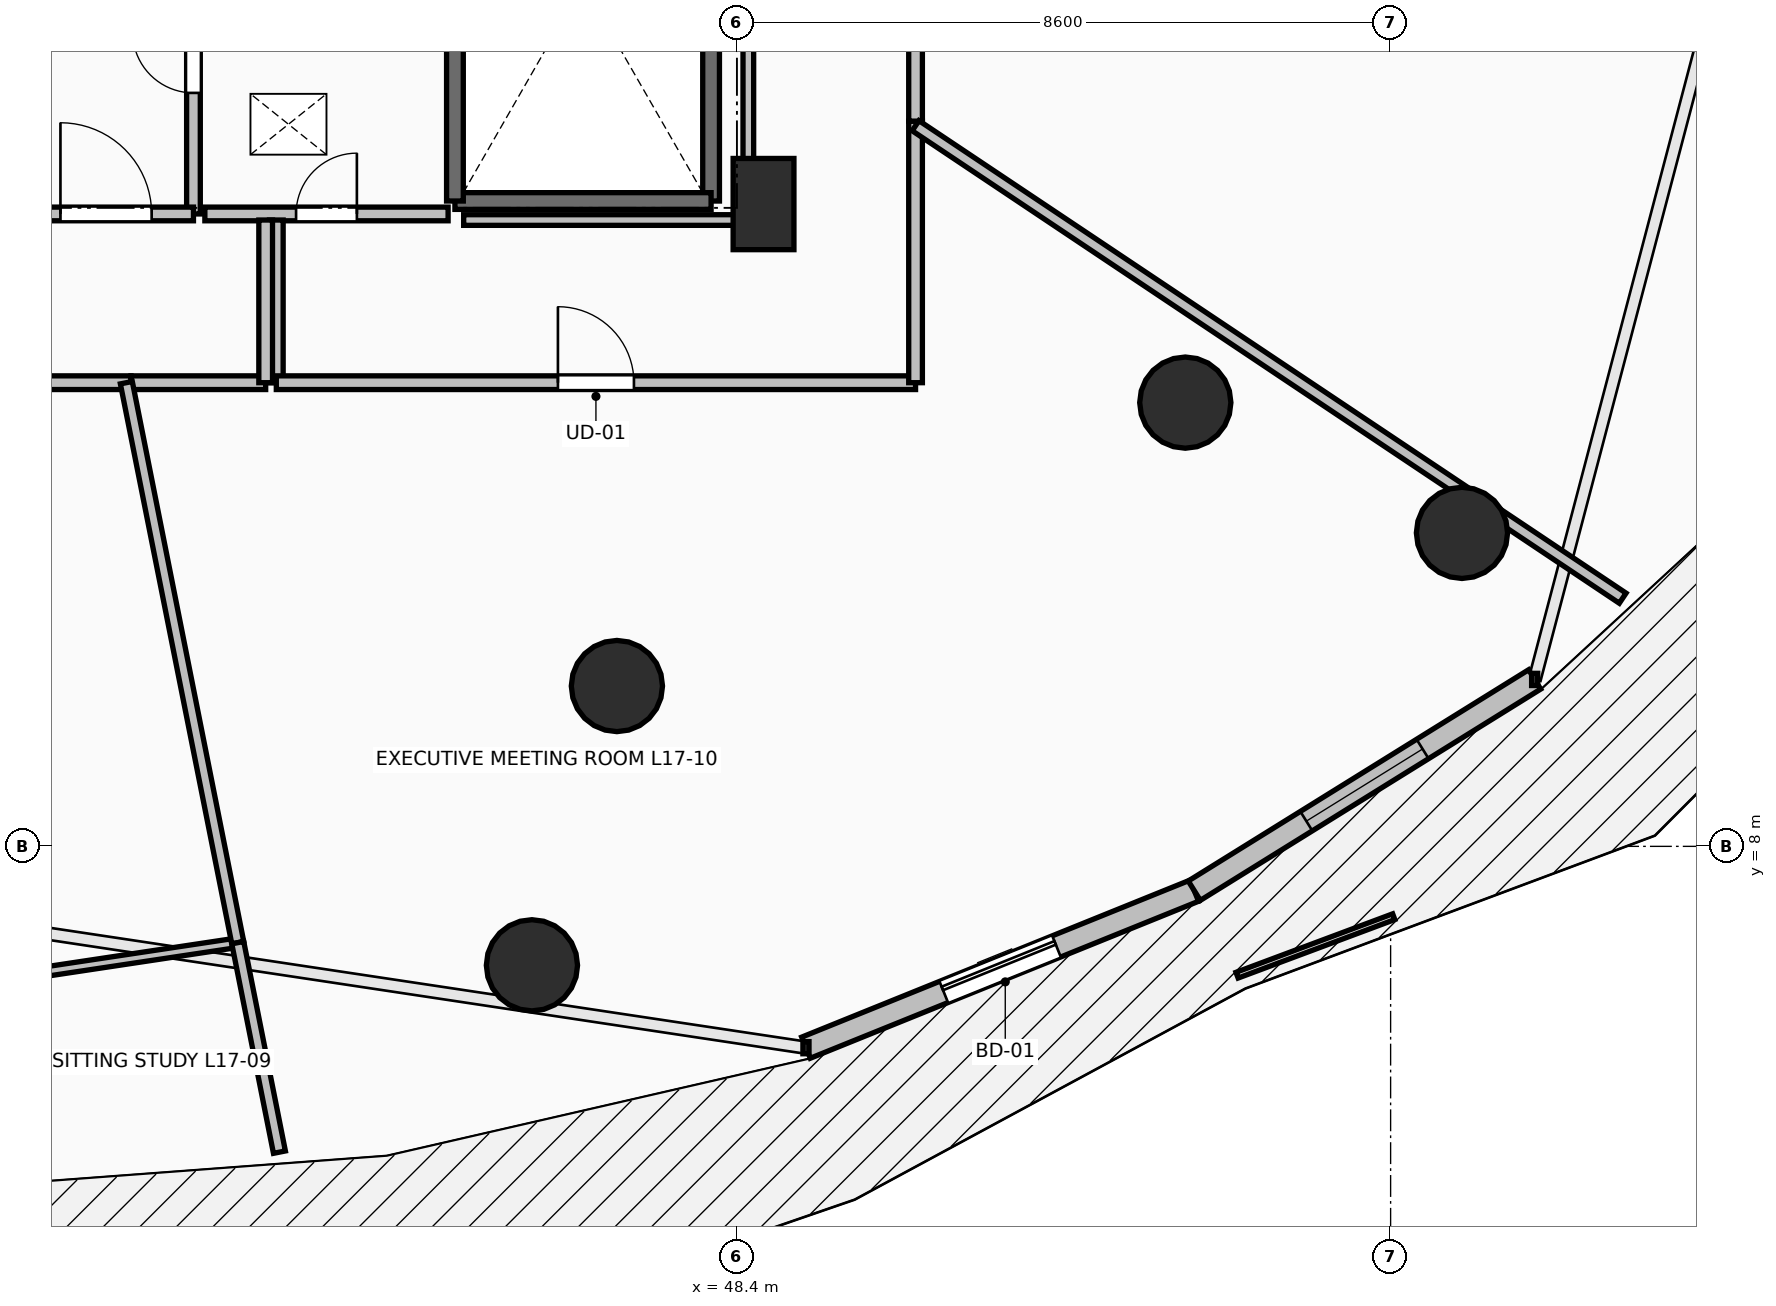
"""IFC4 building model, lengths in metres.
Left out: names, types, materials, properties, quantities, classifications, styles, units other than length and angle.
Written with IfcOpenShell. Run it as: python <this file> out.ifc"""

import sys

from ifc_helpers import new_model, si_unit, direction, frame, frame_2d, origin, origin_2d, place, context, subcontext, project, spatial, rectangle, circle, extrude, element, fill, save


model = new_model("IFC4")
c1 = context("Model", 3, precision=1e-05, world=origin(), true_north=direction((0.0, 1.0)))
c2 = subcontext(c1, "Body", "Model", "MODEL_VIEW")
j1 = project(units=[si_unit("LENGTHUNIT", "METRE"), si_unit("PLANEANGLEUNIT", "RADIAN")], contexts=[c1])
p1 = place(None, origin())
s1 = spatial("IfcSite", under=j1, at=p1, CompositionType="ELEMENT")
p2 = place(p1, origin())
s2 = spatial("IfcBuilding", under=s1, at=p2, CompositionType="ELEMENT")
p3 = place(p2, frame((0.0, 0.0, 66.0)))
s3 = spatial("IfcBuildingStorey", under=s2, at=p3, CompositionType="ELEMENT", Elevation=66.0)
for number, where, z_axis, x_axis in (
    (1, (46.821, 10.109, 0.0), (0.0, 0.0, 1.0), (0.383, -0.924, 0.0)),
    (2, (54.299, 13.838, 0.0), (0.0, 0.0, 1.0), (0.707, -0.707, 0.0)),
    (3, (45.703, 6.435, 0.0), (0.0, 0.0, 1.0), (0.383, -0.924, 0.0)),
    (4, (57.939, 12.124, 0.0), (0.0, 0.0, 1.0), (0.707, -0.707, 0.0)),
):
    element("IfcColumn", number, at=place(p3, frame(where, z_axis=z_axis, x_axis=x_axis)), inside=s3, PredefinedType="COLUMN", context=c2, shape_type="SweptSolid", body=[
        extrude(circle(Radius=0.6, at=origin_2d()), origin(), (0.0, 0.0, 1.0), 3.5),
    ])
p4 = place(p3, frame((48.75, 16.45, 0.0), z_axis=(0.0, 0.0, 1.0), x_axis=(1.0, 0.0, 0.0)))
e5 = element("IfcColumn", 5, at=p4, inside=s3, PredefinedType="PILASTER", context=c2, shape_type="SweptSolid", body=[
    extrude(rectangle(XDim=0.8, YDim=1.2, at=origin_2d()), origin(), (0.0, 0.0, 1.0), 3.5),
])
p5 = place(p3, frame((49.308, 5.351, 0.0), z_axis=(0.0, 0.0, 1.0), x_axis=(0.927095325176, 0.374825636845, 0.0)))
e6 = element("IfcWall", 6, at=p5, inside=s3, PredefinedType="STANDARD", context=c2, shape_type="SweptSolid", body=[
    extrude(rectangle(XDim=5.51, YDim=0.3, at=frame_2d((2.755, 0.0))), origin(), (0.0, 0.0, 1.0), 3.15),
])
p6 = place(p5, frame((1.955, 0.0, 0.0)))
e7 = element("IfcOpeningElement", 7, at=p6, cuts=e6, PredefinedType="OPENING", context=c2, shape_type="SweptSolid", body=[
    extrude(rectangle(XDim=1.6, YDim=2.3, at=frame_2d((0.8, 1.15))), frame((0.0, 0.165, 0.0), z_axis=(0.0, -1.0, 0.0), x_axis=(1.0, 0.0, 0.0)), (0.0, 0.0, 1.0), 0.33),
])
p7 = place(p3, frame((54.417, 7.417, 0.0), z_axis=(0.0, 0.0, 1.0), x_axis=(0.849633724826, 0.527373239404, 0.0)))
e8 = element("IfcWall", 8, at=p7, inside=s3, PredefinedType="STANDARD", context=c2, shape_type="SweptSolid", body=[
    extrude(rectangle(XDim=5.271, YDim=0.3, at=frame_2d((2.635, 0.0))), origin(), (0.0, 0.0, 1.0), 3.15),
])
p8 = place(p7, frame((1.735, 0.0, 0.85)))
e9 = element("IfcOpeningElement", 9, at=p8, cuts=e8, PredefinedType="OPENING", context=c2, shape_type="SweptSolid", body=[
    extrude(rectangle(XDim=1.8, YDim=2.1, at=frame_2d((0.9, 1.05))), frame((0.0, 0.165, 0.0), z_axis=(0.0, -1.0, 0.0), x_axis=(1.0, 0.0, 0.0)), (0.0, 0.0, 1.0), 0.33),
])
p9 = place(p3, frame((48.06, 23.91, 0.0), z_axis=(0.0, 0.0, 1.0), x_axis=(0.0, -1.0, 0.0)))
e10 = element("IfcWall", 10, at=p9, inside=s3, PredefinedType="SOLIDWALL", context=c2, shape_type="SweptSolid", body=[
    extrude(rectangle(XDim=7.42, YDim=0.22, at=frame_2d((3.71, 0.0))), origin(), (0.0, 0.0, 1.0), 3.15),
])
p10 = place(p3, frame((48.06, 16.49, 0.0), z_axis=(0.0, 0.0, 1.0), x_axis=(-1.0, 0.0, 0.0)))
e11 = element("IfcWall", 11, at=p10, inside=s3, PredefinedType="SOLIDWALL", context=c2, shape_type="SweptSolid", body=[
    extrude(rectangle(XDim=3.37, YDim=0.22, at=frame_2d((1.685, 0.0))), origin(), (0.0, 0.0, 1.0), 3.15),
])
p11 = place(p3, frame((44.69, 16.49, 0.0), z_axis=(0.0, 0.0, 1.0), x_axis=(0.0, 1.0, 0.0)))
e12 = element("IfcWall", 12, at=p11, inside=s3, PredefinedType="SOLIDWALL", context=c2, shape_type="SweptSolid", body=[
    extrude(rectangle(XDim=7.42, YDim=0.22, at=frame_2d((3.71, 0.0))), origin(), (0.0, 0.0, 1.0), 3.15),
])
p12 = place(p3, frame((41.25, 16.32, 0.0), z_axis=(0.0, 0.0, 1.0), x_axis=(0.0, 1.0, 0.0)))
e13 = element("IfcWall", 13, at=p12, inside=s3, PredefinedType="PARTITIONING", context=c2, shape_type="SweptSolid", body=[
    extrude(rectangle(XDim=3.985, YDim=0.18, at=frame_2d((1.992, 0.0))), origin(), (0.0, 0.0, 1.0), 3.15),
])
p13 = place(p12, frame((1.593, 0.0, 0.0)))
e14 = element("IfcOpeningElement", 14, at=p13, cuts=e13, PredefinedType="OPENING", context=c2, shape_type="SweptSolid", body=[
    extrude(rectangle(XDim=0.8, YDim=2.05, at=frame_2d((0.4, 1.025))), frame((0.0, 0.105, 0.0), z_axis=(0.0, -1.0, 0.0), x_axis=(1.0, 0.0, 0.0)), (0.0, 0.0, 1.0), 0.21),
])
p14 = place(p3, frame((38.95, 16.32, 0.0), z_axis=(0.0, 0.0, 1.0), x_axis=(1.0, 0.0, 0.0)))
e15 = element("IfcWall", 15, at=p14, inside=s3, PredefinedType="PARTITIONING", context=c2, shape_type="SweptSolid", body=[
    extrude(rectangle(XDim=2.3, YDim=0.18, at=frame_2d((1.15, 0.0))), origin(), (0.0, 0.0, 1.0), 3.15),
])
p15 = place(p14, frame((0.55, 0.0, 0.0)))
e16 = element("IfcOpeningElement", 16, at=p15, cuts=e15, PredefinedType="OPENING", context=c2, shape_type="SweptSolid", body=[
    extrude(rectangle(XDim=1.2, YDim=2.15, at=frame_2d((0.6, 1.075))), frame((0.0, 0.105, 0.0), z_axis=(0.0, -1.0, 0.0), x_axis=(1.0, 0.0, 0.0)), (0.0, 0.0, 1.0), 0.21),
])
p16 = place(p3, frame((41.4, 16.32, 0.0), z_axis=(0.0, 0.0, 1.0), x_axis=(1.0, 0.0, 0.0)))
e17 = element("IfcWall", 17, at=p16, inside=s3, PredefinedType="PARTITIONING", context=c2, shape_type="SweptSolid", body=[
    extrude(rectangle(XDim=3.2, YDim=0.18, at=frame_2d((1.6, 0.0))), origin(), (0.0, 0.0, 1.0), 3.15),
])
p17 = place(p16, frame((1.2, 0.0, 0.0)))
e18 = element("IfcOpeningElement", 18, at=p17, cuts=e17, PredefinedType="OPENING", context=c2, shape_type="SweptSolid", body=[
    extrude(rectangle(XDim=0.8, YDim=2.05, at=frame_2d((0.4, 1.025))), frame((0.0, 0.105, 0.0), z_axis=(0.0, -1.0, 0.0), x_axis=(1.0, 0.0, 0.0)), (0.0, 0.0, 1.0), 0.21),
])
p18 = place(p3, frame((34.982, 14.1, 0.0), z_axis=(0.0, 0.0, 1.0), x_axis=(1.0, 0.0, 0.0)))
e19 = element("IfcWall", 19, at=p18, inside=s3, PredefinedType="PARTITIONING", context=c2, shape_type="SweptSolid", body=[
    extrude(rectangle(XDim=5.446, YDim=0.18, at=frame_2d((2.723, 0.0))), origin(), (0.0, 0.0, 1.0), 3.15),
])
p19 = place(p18, frame((2.198, 0.0, 0.0)))
e20 = element("IfcOpeningElement", 20, at=p19, cuts=e19, PredefinedType="OPENING", context=c2, shape_type="SweptSolid", body=[
    extrude(rectangle(XDim=1.05, YDim=2.2, at=frame_2d((0.525, 1.1))), frame((0.0, 0.105, 0.0), z_axis=(0.0, -1.0, 0.0), x_axis=(1.0, 0.0, 0.0)), (0.0, 0.0, 1.0), 0.21),
])
p20 = place(p3, frame((42.34, 16.24, 0.0), z_axis=(0.0, 0.0, 1.0), x_axis=(0.0, -1.0, 0.0)))
e21 = element("IfcWall", 21, at=p20, inside=s3, PredefinedType="PARTITIONING", context=c2, shape_type="SweptSolid", body=[
    extrude(rectangle(XDim=2.14, YDim=0.18, at=frame_2d((1.07, 0.0))), origin(), (0.0, 0.0, 1.0), 3.15),
])
p21 = place(p3, frame((42.34, 14.1, 0.0), z_axis=(0.0, 0.0, 1.0), x_axis=(1.0, 0.0, 0.0)))
e22 = element("IfcWall", 22, at=p21, inside=s3, PredefinedType="PARTITIONING", context=c2, shape_type="SweptSolid", body=[
    extrude(rectangle(XDim=8.41, YDim=0.18, at=frame_2d((4.205, 0.0))), origin(), (0.0, 0.0, 1.0), 2.342),
])
p22 = place(p21, frame((3.705, 0.0, 0.0)))
e23 = element("IfcOpeningElement", 23, at=p22, cuts=e22, PredefinedType="OPENING", context=c2, shape_type="SweptSolid", body=[
    extrude(rectangle(XDim=1.0, YDim=2.15, at=frame_2d((0.5, 1.075))), frame((0.0, 0.105, 0.0), z_axis=(0.0, -1.0, 0.0), x_axis=(1.0, 0.0, 0.0)), (0.0, 0.0, 1.0), 0.21),
])
p23 = place(p3, frame((50.75, 14.1, 0.0), z_axis=(0.0, 0.0, 1.0), x_axis=(0.0, 1.0, 0.0)))
e24 = element("IfcWall", 24, at=p23, inside=s3, PredefinedType="PARTITIONING", context=c2, shape_type="SweptSolid", body=[
    extrude(rectangle(XDim=3.441, YDim=0.18, at=frame_2d((1.72, 0.0))), origin(), (0.0, 0.0, 1.0), 2.342),
])
p24 = place(p3, frame((40.428, 14.1, 0.0), z_axis=(0.0, 0.0, 1.0), x_axis=(1.0, 0.0, 0.0)))
e25 = element("IfcWall", 25, at=p24, inside=s3, PredefinedType="PARTITIONING", context=c2, shape_type="SweptSolid", body=[
    extrude(rectangle(XDim=1.772, YDim=0.18, at=frame_2d((0.886, 0.0))), origin(), (0.0, 0.0, 1.0), 3.15),
])
p25 = place(p3, frame((42.2, 14.1, 0.0), z_axis=(0.0, 0.0, 1.0), x_axis=(0.0, 1.0, 0.0)))
e26 = element("IfcWall", 26, at=p25, inside=s3, PredefinedType="PARTITIONING", context=c2, shape_type="SweptSolid", body=[
    extrude(rectangle(XDim=2.14, YDim=0.18, at=frame_2d((1.07, 0.0))), origin(), (0.0, 0.0, 1.0), 3.15),
])
p26 = place(p3, frame((50.75, 17.541, 0.0), z_axis=(0.0, 0.0, 1.0), x_axis=(0.0, 1.0, 0.0)))
e27 = element("IfcWall", 27, at=p26, inside=s3, PredefinedType="PARTITIONING", context=c2, shape_type="SweptSolid", body=[
    extrude(rectangle(XDim=10.795, YDim=0.18, at=frame_2d((5.397, 0.0))), origin(), (0.0, 0.0, 1.0), 2.342),
])
p27 = place(p26, frame((4.897, 0.0, 0.0)))
e28 = element("IfcOpeningElement", 28, at=p27, cuts=e27, PredefinedType="OPENING", context=c2, shape_type="SweptSolid", body=[
    extrude(rectangle(XDim=1.0, YDim=2.15, at=frame_2d((0.5, 1.075))), frame((0.0, 0.105, 0.0), z_axis=(0.0, -1.0, 0.0), x_axis=(1.0, 0.0, 0.0)), (0.0, 0.0, 1.0), 0.21),
])
p28 = place(p3, frame((38.0, 6.156, 0.0), z_axis=(0.0, 0.0, 1.0), x_axis=(0.988862311426, 0.148833225599, 0.0)))
e29 = element("IfcWall", 29, at=p28, inside=s3, PredefinedType="PARTITIONING", context=c2, shape_type="SweptSolid", body=[
    extrude(rectangle(XDim=3.876, YDim=0.125, at=frame_2d((1.938, 0.0))), origin(), (0.0, 0.0, 1.0), 2.534),
])
p29 = place(p3, frame((41.833, 6.733, 0.0), z_axis=(0.0, 0.0, 1.0), x_axis=(-0.195172247164, 0.980768980921, 0.0)))
e30 = element("IfcWall", 30, at=p29, inside=s3, PredefinedType="PARTITIONING", context=c2, shape_type="SweptSolid", body=[
    extrude(rectangle(XDim=7.512, YDim=0.16, at=frame_2d((3.756, 0.0))), origin(), (0.0, 0.0, 1.0), 2.342),
])
p30 = place(p3, frame((42.381, 3.977, 0.0), z_axis=(0.0, 0.0, 1.0), x_axis=(-0.195063341769, 0.980790646722, 0.0)))
e31 = element("IfcWall", 31, at=p30, inside=s3, PredefinedType="PARTITIONING", context=c2, shape_type="SweptSolid", body=[
    extrude(rectangle(XDim=2.81, YDim=0.16, at=frame_2d((1.405, 0.0))), origin(), (0.0, 0.0, 1.0), 2.534),
])
p31 = place(p3, frame((60.053, 11.265, 0.0), z_axis=(0.0, 0.0, 1.0), x_axis=(-0.831469078055, 0.555571032577, 0.0)))
e32 = element("IfcWall", 32, at=p31, inside=s3, PredefinedType="PARTITIONING", context=c2, shape_type="SweptSolid", body=[
    extrude(rectangle(XDim=11.189, YDim=0.16, at=frame_2d((5.594, 0.0))), origin(), (0.0, 0.0, 1.0), 2.534),
])
p32 = place(p3, frame((48.55, 23.754, 0.0), z_axis=(0.0, 0.0, 1.0), x_axis=(0.0, -1.0, 0.0)))
e33 = element("IfcWall", 33, at=p32, inside=s3, PredefinedType="PARTITIONING", context=c2, shape_type="SweptSolid", body=[
    extrude(rectangle(XDim=7.514, YDim=0.14, at=frame_2d((3.757, 0.0))), origin(), (0.0, 0.0, 1.0), 2.342),
])
p33 = place(p3, frame((48.55, 16.24, 0.0), z_axis=(0.0, 0.0, 1.0), x_axis=(-1.0, 0.0, 0.0)))
e34 = element("IfcWall", 34, at=p33, inside=s3, PredefinedType="PARTITIONING", context=c2, shape_type="SweptSolid", body=[
    extrude(rectangle(XDim=3.745, YDim=0.14, at=frame_2d((1.873, 0.0))), origin(), (0.0, 0.0, 1.0), 2.342),
])
p34 = place(p6, origin())
e35 = element("IfcDoor", 35, at=p34, inside=s3, OperationType="SLIDING_TO_LEFT", PredefinedType="DOOR", context=c2, shape_type="SweptSolid", body=[
    extrude(rectangle(XDim=1.6, YDim=2.3, at=frame_2d((0.8, 1.15))), frame((0.0, 0.025, 0.0), z_axis=(0.0, -1.0, 0.0), x_axis=(1.0, 0.0, 0.0)), (0.0, 0.0, 1.0), 0.05),
])
fill(e7, e35)
p35 = place(p8, origin())
e36 = element("IfcWindow", 36, at=p35, inside=s3, PartitioningType="SINGLE_PANEL", PredefinedType="WINDOW", context=c2, shape_type="SweptSolid", body=[
    extrude(rectangle(XDim=1.8, YDim=2.1, at=frame_2d((0.9, 1.05))), frame((0.0, 0.03, 0.0), z_axis=(0.0, -1.0, 0.0), x_axis=(1.0, 0.0, 0.0)), (0.0, 0.0, 1.0), 0.06),
])
fill(e9, e36)
p36 = place(p13, origin())
e37 = element("IfcDoor", 37, at=p36, inside=s3, OperationType="SINGLE_SWING_RIGHT", PredefinedType="DOOR", context=c2, shape_type="SweptSolid", body=[
    extrude(rectangle(XDim=0.8, YDim=2.05, at=frame_2d((0.4, 1.025))), frame((0.0, 0.025, 0.0), z_axis=(0.0, -1.0, 0.0), x_axis=(1.0, 0.0, 0.0)), (0.0, 0.0, 1.0), 0.05),
])
fill(e14, e37)
p37 = place(p15, origin())
e38 = element("IfcDoor", 38, at=p37, inside=s3, OperationType="SINGLE_SWING_LEFT", PredefinedType="DOOR", context=c2, shape_type="SweptSolid", body=[
    extrude(rectangle(XDim=1.2, YDim=2.15, at=frame_2d((0.6, 1.075))), frame((0.0, 0.025, 0.0), z_axis=(0.0, -1.0, 0.0), x_axis=(1.0, 0.0, 0.0)), (0.0, 0.0, 1.0), 0.05),
])
fill(e16, e38)
p38 = place(p17, origin())
e39 = element("IfcDoor", 39, at=p38, inside=s3, OperationType="SINGLE_SWING_RIGHT", PredefinedType="DOOR", context=c2, shape_type="SweptSolid", body=[
    extrude(rectangle(XDim=0.8, YDim=2.05, at=frame_2d((0.4, 1.025))), frame((0.0, 0.025, 0.0), z_axis=(0.0, -1.0, 0.0), x_axis=(1.0, 0.0, 0.0)), (0.0, 0.0, 1.0), 0.05),
])
fill(e18, e39)
p39 = place(p22, origin())
e40 = element("IfcDoor", 40, at=p39, inside=s3, OperationType="SINGLE_SWING_LEFT", PredefinedType="DOOR", context=c2, shape_type="SweptSolid", body=[
    extrude(rectangle(XDim=1.0, YDim=2.15, at=frame_2d((0.5, 1.075))), frame((0.0, 0.025, 0.0), z_axis=(0.0, -1.0, 0.0), x_axis=(1.0, 0.0, 0.0)), (0.0, 0.0, 1.0), 0.05),
])
fill(e23, e40)
save(model, sys.argv[1])
